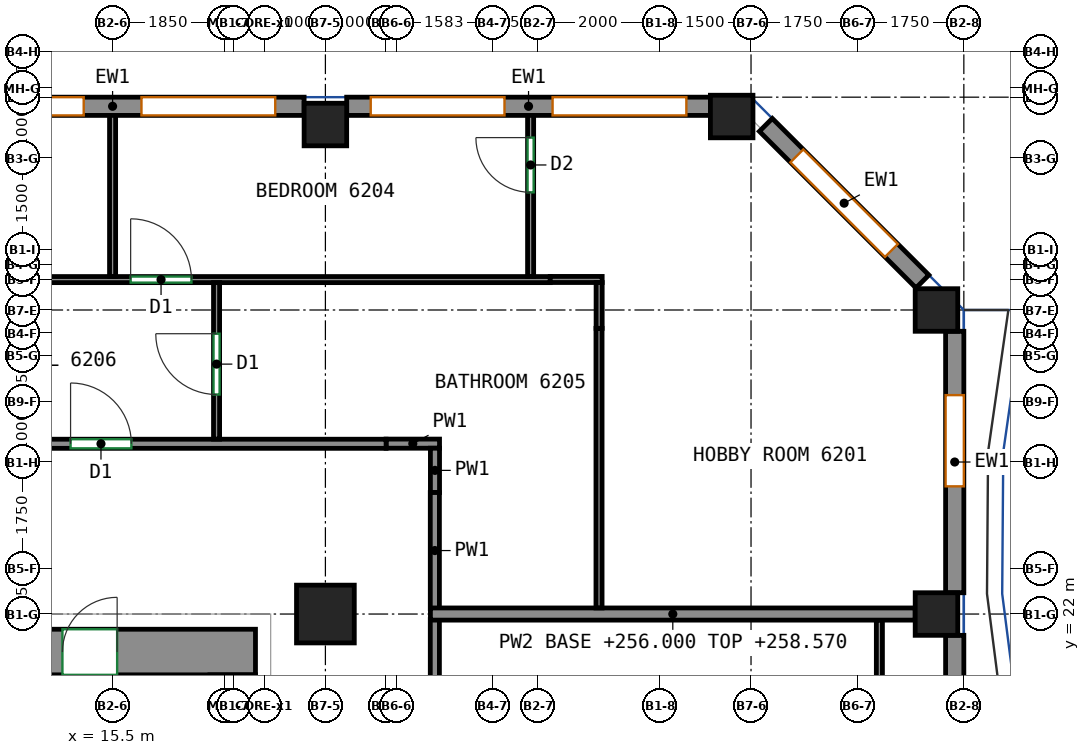
"""IFC4 building model, lengths in metres.
Left out: names, types, materials, properties, quantities, classifications, styles, units other than length and angle.
Written with IfcOpenShell. Run it as: python <this file> out.ifc"""

import sys

from ifc_helpers import new_model, si_unit, direction, frame, frame_2d, origin, origin_2d, place, context, subcontext, project, spatial, rectangle, extrude, source, transform, mapped, element, fill, save


model = new_model("IFC4")
c1 = context("Model", 3, precision=1e-05, world=origin(), true_north=direction((0.0, 1.0)))
c2 = subcontext(c1, "Body", "Model", "MODEL_VIEW")
j1 = project(units=[si_unit("LENGTHUNIT", "METRE"), si_unit("PLANEANGLEUNIT", "RADIAN")], contexts=[c1])
p1 = place(None, origin())
s1 = spatial("IfcSite", under=j1, at=p1, CompositionType="ELEMENT")
p2 = place(p1, origin())
s2 = spatial("IfcBuilding", under=s1, at=p2, CompositionType="ELEMENT")
p3 = place(p2, frame((0.0, 0.0, 256.0)))
s3 = spatial("IfcBuildingStorey", under=s2, at=p3, CompositionType="ELEMENT", Elevation=256.0)
m1 = source(origin(), c2, "Body", "SweptSolid", [
    extrude(rectangle(XDim=0.95, YDim=0.95, at=origin_2d()), origin(), (0.0, 0.0, 1.0), 3.12),
])
p4 = place(p3, frame((19.0, 22.0, 0.0), z_axis=(0.0, 0.0, 1.0), x_axis=(1.0, 0.0, 0.0)))
e1 = element("IfcColumn", 1, at=p4, inside=s3, PredefinedType="COLUMN", context=c2, shape_type="MappedRepresentation", body=[
    mapped(m1, transform((0.0, 0.0, 0.0))),
])
m2 = source(origin(), c2, "Body", "SweptSolid", [
    extrude(rectangle(XDim=0.7, YDim=0.7, at=origin_2d()), origin(), (0.0, 0.0, 1.0), 3.12),
])
for number, where, z_axis, x_axis in (
    (2, (19.0, 30.05, 0.0), (0.0, 0.0, 1.0), (1.0, 0.0, 0.0)),
    (3, (25.682, 30.182, 0.0), (0.0, 0.0, 1.0), (1.0, 0.0, 0.0)),
    (4, (29.05, 22.0, 0.0), (0.0, 0.0, 1.0), (1.0, 0.0, 0.0)),
    (5, (29.05, 27.0, 0.0), (0.0, 0.0, 1.0), (1.0, 0.0, 0.0)),
):
    element("IfcColumn", number, at=place(p3, frame(where, z_axis=z_axis, x_axis=x_axis)), inside=s3, PredefinedType="COLUMN", context=c2, shape_type="MappedRepresentation", body=[
        mapped(m2, transform((0.0, 0.0, 0.0))),
    ])
m3 = source(origin(), c2, "Body", "SweptSolid", [
    extrude(rectangle(XDim=33.6, YDim=0.75, at=frame_2d((16.8, 0.0))), origin(), (0.0, 0.0, 1.0), 3.12),
])
p5 = place(p3, frame((-15.75, 21.375, 0.0), z_axis=(0.0, 0.0, 1.0), x_axis=(1.0, 0.0, 0.0)))
e6 = element("IfcWall", 6, at=p5, inside=s3, PredefinedType="SHEAR", context=c2, shape_type="MappedRepresentation", body=[
    mapped(m3, transform((0.0, 0.0, 0.0))),
])
p6 = place(p5, frame((5.858, 0.0, 0.0)))
e7 = element("IfcOpeningElement", 7, at=p6, cuts=e6, PredefinedType="OPENING", context=c2, shape_type="SweptSolid", body=[
    extrude(rectangle(XDim=0.9, YDim=2.1, at=frame_2d((0.45, 1.05))), frame((0.0, 0.385, 0.0), z_axis=(0.0, -1.0, 0.0), x_axis=(1.0, 0.0, 0.0)), (0.0, 0.0, 1.0), 0.77),
])
p7 = place(p5, frame((10.923, 0.0, 0.0)))
e8 = element("IfcOpeningElement", 8, at=p7, cuts=e6, PredefinedType="OPENING", context=c2, shape_type="SweptSolid", body=[
    extrude(rectangle(XDim=0.9, YDim=2.1, at=frame_2d((0.45, 1.05))), frame((0.0, 0.385, 0.0), z_axis=(0.0, -1.0, 0.0), x_axis=(1.0, 0.0, 0.0)), (0.0, 0.0, 1.0), 0.77),
])
p8 = place(p5, frame((15.988, 0.0, 0.0)))
e9 = element("IfcOpeningElement", 9, at=p8, cuts=e6, PredefinedType="OPENING", context=c2, shape_type="SweptSolid", body=[
    extrude(rectangle(XDim=0.9, YDim=2.1, at=frame_2d((0.45, 1.05))), frame((0.0, 0.385, 0.0), z_axis=(0.0, -1.0, 0.0), x_axis=(1.0, 0.0, 0.0)), (0.0, 0.0, 1.0), 0.77),
])
p9 = place(p5, frame((21.643, 0.0, 0.0)))
e10 = element("IfcOpeningElement", 10, at=p9, cuts=e6, PredefinedType="OPENING", context=c2, shape_type="SweptSolid", body=[
    extrude(rectangle(XDim=0.9, YDim=2.1, at=frame_2d((0.45, 1.05))), frame((0.0, 0.385, 0.0), z_axis=(0.0, -1.0, 0.0), x_axis=(1.0, 0.0, 0.0)), (0.0, 0.0, 1.0), 0.77),
])
p10 = place(p5, frame((27.07, 0.0, 0.0)))
e11 = element("IfcOpeningElement", 11, at=p10, cuts=e6, PredefinedType="OPENING", context=c2, shape_type="SweptSolid", body=[
    extrude(rectangle(XDim=0.9, YDim=2.1, at=frame_2d((0.45, 1.05))), frame((0.0, 0.385, 0.0), z_axis=(0.0, -1.0, 0.0), x_axis=(1.0, 0.0, 0.0)), (0.0, 0.0, 1.0), 0.77),
])
p11 = place(p5, frame((2.275, 0.0, 0.0)))
e12 = element("IfcOpeningElement", 12, at=p11, cuts=e6, PredefinedType="OPENING", context=c2, shape_type="SweptSolid", body=[
    extrude(rectangle(XDim=0.9, YDim=2.1, at=frame_2d((0.45, 1.05))), frame((0.0, 0.385, 0.0), z_axis=(0.0, -1.0, 0.0), x_axis=(1.0, 0.0, 0.0)), (0.0, 0.0, 1.0), 0.77),
])
p12 = place(p5, frame((30.425, 0.0, 0.0)))
e13 = element("IfcOpeningElement", 13, at=p12, cuts=e6, PredefinedType="OPENING", context=c2, shape_type="SweptSolid", body=[
    extrude(rectangle(XDim=0.9, YDim=2.1, at=frame_2d((0.45, 1.05))), frame((0.0, 0.385, 0.0), z_axis=(0.0, -1.0, 0.0), x_axis=(1.0, 0.0, 0.0)), (0.0, 0.0, 1.0), 0.77),
])
m4 = source(origin(), c2, "Body", "SweptSolid", [
    extrude(rectangle(XDim=13.3, YDim=0.3, at=frame_2d((6.65, 0.0))), origin(), (0.0, 0.0, 1.0), 3.12),
])
p13 = place(p3, frame((29.35, 8.35, 0.0), z_axis=(0.0, 0.0, 1.0), x_axis=(0.0, 1.0, 0.0)))
e14 = element("IfcWall", 14, at=p13, inside=s3, PredefinedType="SOLIDWALL", context=c2, shape_type="MappedRepresentation", body=[
    mapped(m4, transform((0.0, 0.0, 0.0))),
])
p14 = place(p13, frame((0.913, 0.0, 0.8)))
e15 = element("IfcOpeningElement", 15, at=p14, cuts=e14, PredefinedType="OPENING", context=c2, shape_type="SweptSolid", body=[
    extrude(rectangle(XDim=1.5, YDim=2.05, at=frame_2d((0.75, 1.025))), frame((0.0, 0.16, 0.0), z_axis=(0.0, -1.0, 0.0), x_axis=(1.0, 0.0, 0.0)), (0.0, 0.0, 1.0), 0.32),
])
p15 = place(p13, frame((4.238, 0.0, 0.8)))
e16 = element("IfcOpeningElement", 16, at=p15, cuts=e14, PredefinedType="OPENING", context=c2, shape_type="SweptSolid", body=[
    extrude(rectangle(XDim=1.5, YDim=2.05, at=frame_2d((0.75, 1.025))), frame((0.0, 0.16, 0.0), z_axis=(0.0, -1.0, 0.0), x_axis=(1.0, 0.0, 0.0)), (0.0, 0.0, 1.0), 0.32),
])
p16 = place(p13, frame((7.562, 0.0, 0.8)))
e17 = element("IfcOpeningElement", 17, at=p16, cuts=e14, PredefinedType="OPENING", context=c2, shape_type="SweptSolid", body=[
    extrude(rectangle(XDim=1.5, YDim=2.05, at=frame_2d((0.75, 1.025))), frame((0.0, 0.16, 0.0), z_axis=(0.0, -1.0, 0.0), x_axis=(1.0, 0.0, 0.0)), (0.0, 0.0, 1.0), 0.32),
])
p17 = place(p13, frame((10.887, 0.0, 0.8)))
e18 = element("IfcOpeningElement", 18, at=p17, cuts=e14, PredefinedType="OPENING", context=c2, shape_type="SweptSolid", body=[
    extrude(rectangle(XDim=1.5, YDim=2.05, at=frame_2d((0.75, 1.025))), frame((0.0, 0.16, 0.0), z_axis=(0.0, -1.0, 0.0), x_axis=(1.0, 0.0, 0.0)), (0.0, 0.0, 1.0), 0.32),
])
m5 = source(origin(), c2, "Body", "SweptSolid", [
    extrude(rectangle(XDim=4.3, YDim=0.3, at=frame_2d((2.15, 0.0))), origin(), (0.0, 0.0, 1.0), 3.12),
])
p18 = place(p3, frame((29.35, 22.35, 0.0), z_axis=(0.0, 0.0, 1.0), x_axis=(0.0, 1.0, 0.0)))
e19 = element("IfcWall", 19, at=p18, inside=s3, PredefinedType="SOLIDWALL", context=c2, shape_type="MappedRepresentation", body=[
    mapped(m5, transform((0.0, 0.0, 0.0))),
])
p19 = place(p18, frame((1.75, 0.0, 0.8)))
e20 = element("IfcOpeningElement", 20, at=p19, cuts=e19, PredefinedType="OPENING", context=c2, shape_type="SweptSolid", body=[
    extrude(rectangle(XDim=1.5, YDim=2.05, at=frame_2d((0.75, 1.025))), frame((0.0, 0.16, 0.0), z_axis=(0.0, -1.0, 0.0), x_axis=(1.0, 0.0, 0.0)), (0.0, 0.0, 1.0), 0.32),
])
m6 = source(origin(), c2, "Body", "SweptSolid", [
    extrude(rectangle(XDim=3.642, YDim=0.3, at=frame_2d((1.821, 0.0))), origin(), (0.0, 0.0, 1.0), 3.12),
])
p20 = place(p3, frame((28.819, 27.469, 0.0), z_axis=(0.0, 0.0, 1.0), x_axis=(-0.707106781187, 0.707106781187, 0.0)))
e21 = element("IfcWall", 21, at=p20, inside=s3, PredefinedType="SOLIDWALL", context=c2, shape_type="MappedRepresentation", body=[
    mapped(m6, transform((0.0, 0.0, 0.0))),
])
p21 = place(p20, frame((0.721, 0.0, 0.8)))
e22 = element("IfcOpeningElement", 22, at=p21, cuts=e21, PredefinedType="OPENING", context=c2, shape_type="SweptSolid", body=[
    extrude(rectangle(XDim=2.2, YDim=2.05, at=frame_2d((1.1, 1.025))), frame((0.0, 0.16, 0.0), z_axis=(0.0, -1.0, 0.0), x_axis=(1.0, 0.0, 0.0)), (0.0, 0.0, 1.0), 0.32),
])
m7 = source(origin(), c2, "Body", "SweptSolid", [
    extrude(rectangle(XDim=5.982, YDim=0.3, at=frame_2d((2.991, 0.0))), origin(), (0.0, 0.0, 1.0), 3.12),
])
p22 = place(p3, frame((25.332, 30.35, 0.0), z_axis=(0.0, 0.0, 1.0), x_axis=(-1.0, 0.0, 0.0)))
e23 = element("IfcWall", 23, at=p22, inside=s3, PredefinedType="SOLIDWALL", context=c2, shape_type="MappedRepresentation", body=[
    mapped(m7, transform((0.0, 0.0, 0.0))),
])
p23 = place(p22, frame((0.396, 0.0, 0.8)))
e24 = element("IfcOpeningElement", 24, at=p23, cuts=e23, PredefinedType="OPENING", context=c2, shape_type="SweptSolid", body=[
    extrude(rectangle(XDim=2.2, YDim=2.05, at=frame_2d((1.1, 1.025))), frame((0.0, 0.16, 0.0), z_axis=(0.0, -1.0, 0.0), x_axis=(1.0, 0.0, 0.0)), (0.0, 0.0, 1.0), 0.32),
])
p24 = place(p22, frame((3.386, 0.0, 0.8)))
e25 = element("IfcOpeningElement", 25, at=p24, cuts=e23, PredefinedType="OPENING", context=c2, shape_type="SweptSolid", body=[
    extrude(rectangle(XDim=2.2, YDim=2.05, at=frame_2d((1.1, 1.025))), frame((0.0, 0.16, 0.0), z_axis=(0.0, -1.0, 0.0), x_axis=(1.0, 0.0, 0.0)), (0.0, 0.0, 1.0), 0.32),
])
m8 = source(origin(), c2, "Body", "SweptSolid", [
    extrude(rectangle(XDim=6.3, YDim=0.3, at=frame_2d((3.15, 0.0))), origin(), (0.0, 0.0, 1.0), 3.12),
])
p25 = place(p3, frame((18.65, 30.35, 0.0), z_axis=(0.0, 0.0, 1.0), x_axis=(-1.0, 0.0, 0.0)))
e26 = element("IfcWall", 26, at=p25, inside=s3, PredefinedType="SOLIDWALL", context=c2, shape_type="MappedRepresentation", body=[
    mapped(m8, transform((0.0, 0.0, 0.0))),
])
p26 = place(p25, frame((0.475, 0.0, 0.8)))
e27 = element("IfcOpeningElement", 27, at=p26, cuts=e26, PredefinedType="OPENING", context=c2, shape_type="SweptSolid", body=[
    extrude(rectangle(XDim=2.2, YDim=2.05, at=frame_2d((1.1, 1.025))), frame((0.0, 0.16, 0.0), z_axis=(0.0, -1.0, 0.0), x_axis=(1.0, 0.0, 0.0)), (0.0, 0.0, 1.0), 0.32),
])
p27 = place(p25, frame((3.625, 0.0, 0.8)))
e28 = element("IfcOpeningElement", 28, at=p27, cuts=e26, PredefinedType="OPENING", context=c2, shape_type="SweptSolid", body=[
    extrude(rectangle(XDim=2.2, YDim=2.05, at=frame_2d((1.1, 1.025))), frame((0.0, 0.16, 0.0), z_axis=(0.0, -1.0, 0.0), x_axis=(1.0, 0.0, 0.0)), (0.0, 0.0, 1.0), 0.32),
])
p28 = place(p3, frame((20.8, 17.75, 0.0), z_axis=(0.0, 0.0, 1.0), x_axis=(0.0, 1.0, 0.0)))
e29 = element("IfcWall", 29, at=p28, inside=s3, PredefinedType="PARTITIONING", context=c2, shape_type="SweptSolid", body=[
    extrude(rectangle(XDim=4.16, YDim=0.15, at=frame_2d((2.08, 0.0))), origin(), (0.0, 0.0, 1.0), 3.12),
])
p29 = place(p3, frame((20.877, 24.802, 0.0), z_axis=(0.0, 0.0, 1.0), x_axis=(-1.0, 0.0, 0.0)))
e30 = element("IfcWall", 30, at=p29, inside=s3, PredefinedType="PARTITIONING", context=c2, shape_type="SweptSolid", body=[
    extrude(rectangle(XDim=0.879, YDim=0.15, at=frame_2d((0.439, 0.0))), origin(), (0.0, 0.0, 1.0), 3.12),
])
p30 = place(p3, frame((20.802, 23.998, 0.0), z_axis=(0.0, 0.0, 1.0), x_axis=(0.0, 1.0, 0.0)))
e31 = element("IfcWall", 31, at=p30, inside=s3, PredefinedType="PARTITIONING", context=c2, shape_type="SweptSolid", body=[
    extrude(rectangle(XDim=0.729, YDim=0.15, at=frame_2d((0.365, 0.0))), origin(), (0.0, 0.0, 1.0), 3.12),
])
p31 = place(p3, frame((20.8, 22.09, 0.0), z_axis=(0.0, 0.0, 1.0), x_axis=(0.0, 1.0, 0.0)))
e32 = element("IfcWall", 32, at=p31, inside=s3, PredefinedType="PARTITIONING", context=c2, shape_type="SweptSolid", body=[
    extrude(rectangle(XDim=1.908, YDim=0.15, at=frame_2d((0.954, 0.0))), origin(), (0.0, 0.0, 1.0), 3.12),
])
p32 = place(p3, frame((-16.075, 24.8, 0.0), z_axis=(0.0, 0.0, 1.0), x_axis=(1.0, 0.0, 0.0)))
e33 = element("IfcWall", 33, at=p32, inside=s3, PredefinedType="PARTITIONING", context=c2, shape_type="SweptSolid", body=[
    extrude(rectangle(XDim=36.073, YDim=0.15, at=frame_2d((18.037, 0.0))), origin(), (0.0, 0.0, 1.0), 3.12),
])
p33 = place(p32, frame((19.985, 0.0, 0.0)))
e34 = element("IfcOpeningElement", 34, at=p33, cuts=e33, PredefinedType="OPENING", context=c2, shape_type="SweptSolid", body=[
    extrude(rectangle(XDim=0.9, YDim=2.1, at=frame_2d((0.45, 1.05))), frame((0.0, 0.085, 0.0), z_axis=(0.0, -1.0, 0.0), x_axis=(1.0, 0.0, 0.0)), (0.0, 0.0, 1.0), 0.17),
])
p34 = place(p32, frame((30.884, 0.0, 0.0)))
e35 = element("IfcOpeningElement", 35, at=p34, cuts=e33, PredefinedType="OPENING", context=c2, shape_type="SweptSolid", body=[
    extrude(rectangle(XDim=1.0, YDim=2.1, at=frame_2d((0.5, 1.05))), frame((0.0, 0.085, 0.0), z_axis=(0.0, -1.0, 0.0), x_axis=(1.0, 0.0, 0.0)), (0.0, 0.0, 1.0), 0.17),
])
p35 = place(p3, frame((28.111, 12.841, 0.0), z_axis=(0.0, 0.0, 1.0), x_axis=(0.0, 1.0, 0.0)))
e36 = element("IfcWall", 36, at=p35, inside=s3, PredefinedType="PARTITIONING", context=c2, shape_type="SweptSolid", body=[
    extrude(rectangle(XDim=9.059, YDim=0.1, at=frame_2d((4.529, 0.0))), origin(), (0.0, 0.0, 1.0), 3.12),
])
p36 = place(p3, frame((20.727, 22.0, 0.0), z_axis=(0.0, 0.0, 1.0), x_axis=(1.0, 0.0, 0.0)))
e37 = element("IfcWall", 37, at=p36, inside=s3, PredefinedType="PARTITIONING", context=c2, shape_type="SweptSolid", body=[
    extrude(rectangle(XDim=7.973, YDim=0.2, at=frame_2d((3.986, 0.0))), origin(), (0.0, 0.0, 1.0), 2.57),
])
p37 = place(p3, frame((4.9, 27.5, 0.0), z_axis=(0.0, 0.0, 1.0), x_axis=(1.0, 0.0, 0.0)))
e38 = element("IfcWall", 38, at=p37, inside=s3, PredefinedType="PARTITIONING", context=c2, shape_type="SweptSolid", body=[
    extrude(rectangle(XDim=17.798, YDim=0.1, at=frame_2d((8.899, 0.0))), origin(), (0.0, 0.0, 1.0), 3.12),
])
p38 = place(p37, frame((8.201, 0.0, 0.0)))
e39 = element("IfcOpeningElement", 39, at=p38, cuts=e38, PredefinedType="OPENING", context=c2, shape_type="SweptSolid", body=[
    extrude(rectangle(XDim=1.0, YDim=2.1, at=frame_2d((0.5, 1.05))), frame((0.0, 0.06, 0.0), z_axis=(0.0, -1.0, 0.0), x_axis=(1.0, 0.0, 0.0)), (0.0, 0.0, 1.0), 0.12),
])
p39 = place(p37, frame((10.897, 0.0, 0.0)))
e40 = element("IfcOpeningElement", 40, at=p39, cuts=e38, PredefinedType="OPENING", context=c2, shape_type="SweptSolid", body=[
    extrude(rectangle(XDim=1.0, YDim=2.1, at=frame_2d((0.5, 1.05))), frame((0.0, 0.06, 0.0), z_axis=(0.0, -1.0, 0.0), x_axis=(1.0, 0.0, 0.0)), (0.0, 0.0, 1.0), 0.12),
])
p40 = place(p3, frame((17.21, 24.877, 0.0), z_axis=(0.0, 0.0, 1.0), x_axis=(0.0, 1.0, 0.0)))
e41 = element("IfcWall", 41, at=p40, inside=s3, PredefinedType="PARTITIONING", context=c2, shape_type="SweptSolid", body=[
    extrude(rectangle(XDim=2.573, YDim=0.1, at=frame_2d((1.287, 0.0))), origin(), (0.0, 0.0, 1.0), 3.12),
])
p41 = place(p40, frame((0.733, 0.0, 0.0)))
e42 = element("IfcOpeningElement", 42, at=p41, cuts=e41, PredefinedType="OPENING", context=c2, shape_type="SweptSolid", body=[
    extrude(rectangle(XDim=1.0, YDim=2.1, at=frame_2d((0.5, 1.05))), frame((0.0, 0.06, 0.0), z_axis=(0.0, -1.0, 0.0), x_axis=(1.0, 0.0, 0.0)), (0.0, 0.0, 1.0), 0.12),
])
p42 = place(p3, frame((23.552, 27.502, 0.0), z_axis=(0.0, 0.0, 1.0), x_axis=(-1.0, 0.0, 0.0)))
e43 = element("IfcWall", 43, at=p42, inside=s3, PredefinedType="PARTITIONING", context=c2, shape_type="SweptSolid", body=[
    extrude(rectangle(XDim=0.854, YDim=0.1, at=frame_2d((0.427, 0.0))), origin(), (0.0, 0.0, 1.0), 3.12),
])
p43 = place(p3, frame((23.502, 26.698, 0.0), z_axis=(0.0, 0.0, 1.0), x_axis=(0.0, 1.0, 0.0)))
e44 = element("IfcWall", 44, at=p43, inside=s3, PredefinedType="PARTITIONING", context=c2, shape_type="SweptSolid", body=[
    extrude(rectangle(XDim=0.754, YDim=0.1, at=frame_2d((0.377, 0.0))), origin(), (0.0, 0.0, 1.0), 3.12),
])
p44 = place(p3, frame((23.5, 22.1, 0.0), z_axis=(0.0, 0.0, 1.0), x_axis=(0.0, 1.0, 0.0)))
e45 = element("IfcWall", 45, at=p44, inside=s3, PredefinedType="PARTITIONING", context=c2, shape_type="SweptSolid", body=[
    extrude(rectangle(XDim=4.598, YDim=0.1, at=frame_2d((2.299, 0.0))), origin(), (0.0, 0.0, 1.0), 3.12),
])
p45 = place(p3, frame((15.5, 27.552, 0.0), z_axis=(0.0, 0.0, 1.0), x_axis=(0.0, 1.0, 0.0)))
e46 = element("IfcWall", 46, at=p45, inside=s3, PredefinedType="PARTITIONING", context=c2, shape_type="SweptSolid", body=[
    extrude(rectangle(XDim=2.698, YDim=0.1, at=frame_2d((1.349, 0.0))), origin(), (0.0, 0.0, 1.0), 3.12),
])
p46 = place(p3, frame((22.375, 27.552, 0.0), z_axis=(0.0, 0.0, 1.0), x_axis=(0.0, 1.0, 0.0)))
e47 = element("IfcWall", 47, at=p46, inside=s3, PredefinedType="PARTITIONING", context=c2, shape_type="SweptSolid", body=[
    extrude(rectangle(XDim=2.698, YDim=0.1, at=frame_2d((1.349, 0.0))), origin(), (0.0, 0.0, 1.0), 3.12),
])
p47 = place(p46, frame((1.383, 0.0, 0.0)))
e48 = element("IfcOpeningElement", 48, at=p47, cuts=e47, PredefinedType="OPENING", context=c2, shape_type="SweptSolid", body=[
    extrude(rectangle(XDim=0.9, YDim=2.1, at=frame_2d((0.45, 1.05))), frame((0.0, 0.06, 0.0), z_axis=(0.0, -1.0, 0.0), x_axis=(1.0, 0.0, 0.0)), (0.0, 0.0, 1.0), 0.12),
])
p48 = place(p19, origin())
e49 = element("IfcWindow", 49, at=p48, inside=s3, PartitioningType="SINGLE_PANEL", PredefinedType="WINDOW", context=c2, shape_type="SweptSolid", body=[
    extrude(rectangle(XDim=1.5, YDim=2.05, at=frame_2d((0.75, 1.025))), frame((0.0, 0.03, 0.0), z_axis=(0.0, -1.0, 0.0), x_axis=(1.0, 0.0, 0.0)), (0.0, 0.0, 1.0), 0.06),
])
fill(e20, e49)
p49 = place(p21, origin())
e50 = element("IfcWindow", 50, at=p49, inside=s3, PartitioningType="SINGLE_PANEL", PredefinedType="WINDOW", context=c2, shape_type="SweptSolid", body=[
    extrude(rectangle(XDim=2.2, YDim=2.05, at=frame_2d((1.1, 1.025))), frame((0.0, 0.03, 0.0), z_axis=(0.0, -1.0, 0.0), x_axis=(1.0, 0.0, 0.0)), (0.0, 0.0, 1.0), 0.06),
])
fill(e22, e50)
p50 = place(p23, origin())
e51 = element("IfcWindow", 51, at=p50, inside=s3, PartitioningType="SINGLE_PANEL", PredefinedType="WINDOW", context=c2, shape_type="SweptSolid", body=[
    extrude(rectangle(XDim=2.2, YDim=2.05, at=frame_2d((1.1, 1.025))), frame((0.0, 0.03, 0.0), z_axis=(0.0, -1.0, 0.0), x_axis=(1.0, 0.0, 0.0)), (0.0, 0.0, 1.0), 0.06),
])
fill(e24, e51)
p51 = place(p24, origin())
e52 = element("IfcWindow", 52, at=p51, inside=s3, PartitioningType="SINGLE_PANEL", PredefinedType="WINDOW", context=c2, shape_type="SweptSolid", body=[
    extrude(rectangle(XDim=2.2, YDim=2.05, at=frame_2d((1.1, 1.025))), frame((0.0, 0.03, 0.0), z_axis=(0.0, -1.0, 0.0), x_axis=(1.0, 0.0, 0.0)), (0.0, 0.0, 1.0), 0.06),
])
fill(e25, e52)
p52 = place(p26, origin())
e53 = element("IfcWindow", 53, at=p52, inside=s3, PartitioningType="SINGLE_PANEL", PredefinedType="WINDOW", context=c2, shape_type="SweptSolid", body=[
    extrude(rectangle(XDim=2.2, YDim=2.05, at=frame_2d((1.1, 1.025))), frame((0.0, 0.03, 0.0), z_axis=(0.0, -1.0, 0.0), x_axis=(1.0, 0.0, 0.0)), (0.0, 0.0, 1.0), 0.06),
])
fill(e27, e53)
p53 = place(p27, origin())
e54 = element("IfcWindow", 54, at=p53, inside=s3, PartitioningType="SINGLE_PANEL", PredefinedType="WINDOW", context=c2, shape_type="SweptSolid", body=[
    extrude(rectangle(XDim=2.2, YDim=2.05, at=frame_2d((1.1, 1.025))), frame((0.0, 0.03, 0.0), z_axis=(0.0, -1.0, 0.0), x_axis=(1.0, 0.0, 0.0)), (0.0, 0.0, 1.0), 0.06),
])
fill(e28, e54)
p54 = place(p12, origin())
e55 = element("IfcDoor", 55, at=p54, inside=s3, OperationType="SINGLE_SWING_RIGHT", PredefinedType="DOOR", context=c2, shape_type="SweptSolid", body=[
    extrude(rectangle(XDim=0.9, YDim=2.1, at=frame_2d((0.45, 1.05))), frame((0.0, -0.23, 0.0), z_axis=(0.0, -1.0, 0.0), x_axis=(1.0, 0.0, 0.0)), (0.0, 0.0, 1.0), 0.05),
])
fill(e13, e55)
p55 = place(p34, origin())
e56 = element("IfcDoor", 56, at=p55, inside=s3, OperationType="SINGLE_SWING_LEFT", PredefinedType="DOOR", context=c2, shape_type="SweptSolid", body=[
    extrude(rectangle(XDim=1.0, YDim=2.1, at=frame_2d((0.5, 1.05))), frame((0.0, 0.025, 0.0), z_axis=(0.0, -1.0, 0.0), x_axis=(1.0, 0.0, 0.0)), (0.0, 0.0, 1.0), 0.05),
])
fill(e35, e56)
p56 = place(p41, origin())
e57 = element("IfcDoor", 57, at=p56, inside=s3, OperationType="SINGLE_SWING_RIGHT", PredefinedType="DOOR", context=c2, shape_type="SweptSolid", body=[
    extrude(rectangle(XDim=1.0, YDim=2.1, at=frame_2d((0.5, 1.05))), frame((0.0, 0.025, 0.0), z_axis=(0.0, -1.0, 0.0), x_axis=(1.0, 0.0, 0.0)), (0.0, 0.0, 1.0), 0.05),
])
fill(e42, e57)
p57 = place(p39, origin())
e58 = element("IfcDoor", 58, at=p57, inside=s3, OperationType="SINGLE_SWING_LEFT", PredefinedType="DOOR", context=c2, shape_type="SweptSolid", body=[
    extrude(rectangle(XDim=1.0, YDim=2.1, at=frame_2d((0.5, 1.05))), frame((0.0, 0.025, 0.0), z_axis=(0.0, -1.0, 0.0), x_axis=(1.0, 0.0, 0.0)), (0.0, 0.0, 1.0), 0.05),
])
fill(e40, e58)
p58 = place(p47, origin())
e59 = element("IfcDoor", 59, at=p58, inside=s3, OperationType="SINGLE_SWING_RIGHT", PredefinedType="DOOR", context=c2, shape_type="SweptSolid", body=[
    extrude(rectangle(XDim=0.9, YDim=2.1, at=frame_2d((0.45, 1.05))), frame((0.0, 0.025, 0.0), z_axis=(0.0, -1.0, 0.0), x_axis=(1.0, 0.0, 0.0)), (0.0, 0.0, 1.0), 0.05),
])
fill(e48, e59)
save(model, sys.argv[1])
